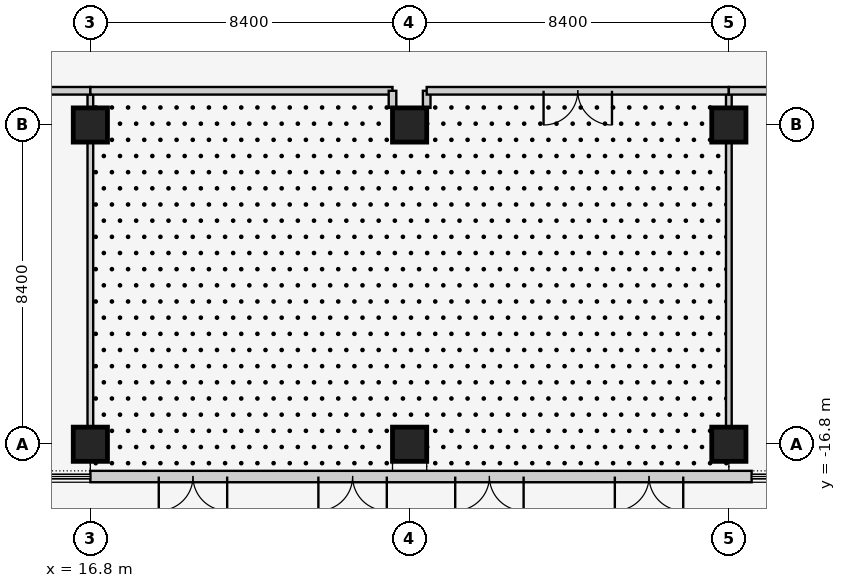
"""IFC4 building model, lengths in metres.
Left out: names, types, materials, properties, quantities, classifications, styles, units other than length and angle.
Written with IfcOpenShell. Run it as: python <this file> out.ifc"""

import sys

from ifc_helpers import new_model, si_unit, direction, frame, frame_2d, origin, origin_2d, place, context, subcontext, project, spatial, rectangle, extrude, element, fill, save


model = new_model("IFC4")
c1 = context("Model", 3, precision=1e-05, world=origin(), true_north=direction((0.0, 1.0)))
c2 = subcontext(c1, "Body", "Model", "MODEL_VIEW")
j1 = project(units=[si_unit("LENGTHUNIT", "METRE"), si_unit("PLANEANGLEUNIT", "RADIAN")], contexts=[c1])
p1 = place(None, origin())
s1 = spatial("IfcSite", under=j1, at=p1, CompositionType="ELEMENT")
p2 = place(p1, origin())
s2 = spatial("IfcBuilding", under=s1, at=p2, CompositionType="ELEMENT")
p3 = place(p2, origin())
s3 = spatial("IfcBuildingStorey", under=s2, at=p3, CompositionType="ELEMENT", Elevation=0.0)
for number, where, z_axis, x_axis in (
    (1, (16.8, -16.8, 0.0), (0.0, 0.0, 1.0), (1.0, 0.0, 0.0)),
    (2, (16.8, -8.4, 0.0), (0.0, 0.0, 1.0), (1.0, 0.0, 0.0)),
    (3, (25.2, -16.8, 0.0), (0.0, 0.0, 1.0), (1.0, 0.0, 0.0)),
    (4, (25.2, -8.4, 0.0), (0.0, 0.0, 1.0), (1.0, 0.0, 0.0)),
    (5, (33.6, -16.8, 0.0), (0.0, 0.0, 1.0), (1.0, 0.0, 0.0)),
    (6, (33.6, -8.4, 0.0), (0.0, 0.0, 1.0), (1.0, 0.0, 0.0)),
):
    element("IfcColumn", number, at=place(p3, frame(where, z_axis=z_axis, x_axis=x_axis)), inside=s3, PredefinedType="COLUMN", context=c2, shape_type="SweptSolid", body=[
        extrude(rectangle(XDim=0.9, YDim=0.9, at=origin_2d()), origin(), (0.0, 0.0, 1.0), 6.0),
    ])
p4 = place(p3, frame((16.8, -17.65, 0.0), z_axis=(0.0, 0.0, 1.0), x_axis=(1.0, 0.0, 0.0)))
e7 = element("IfcWall", 7, at=p4, inside=s3, PredefinedType="SOLIDWALL", context=c2, shape_type="SweptSolid", body=[
    extrude(rectangle(XDim=17.4, YDim=0.3, at=frame_2d((8.7, 0.0))), origin(), (0.0, 0.0, 1.0), 5.8),
])
p5 = place(p4, frame((1.8, 0.0, 0.0)))
e8 = element("IfcOpeningElement", 8, at=p5, cuts=e7, PredefinedType="OPENING", context=c2, shape_type="SweptSolid", body=[
    extrude(rectangle(XDim=1.8, YDim=2.4, at=frame_2d((0.9, 1.2))), frame((0.0, 0.16, 0.0), z_axis=(0.0, -1.0, 0.0), x_axis=(1.0, 0.0, 0.0)), (0.0, 0.0, 1.0), 0.32),
])
p6 = place(p4, frame((6.0, 0.0, 0.0)))
e9 = element("IfcOpeningElement", 9, at=p6, cuts=e7, PredefinedType="OPENING", context=c2, shape_type="SweptSolid", body=[
    extrude(rectangle(XDim=1.8, YDim=2.4, at=frame_2d((0.9, 1.2))), frame((0.0, 0.16, 0.0), z_axis=(0.0, -1.0, 0.0), x_axis=(1.0, 0.0, 0.0)), (0.0, 0.0, 1.0), 0.32),
])
p7 = place(p4, frame((9.6, 0.0, 0.0)))
e10 = element("IfcOpeningElement", 10, at=p7, cuts=e7, PredefinedType="OPENING", context=c2, shape_type="SweptSolid", body=[
    extrude(rectangle(XDim=1.8, YDim=2.4, at=frame_2d((0.9, 1.2))), frame((0.0, 0.16, 0.0), z_axis=(0.0, -1.0, 0.0), x_axis=(1.0, 0.0, 0.0)), (0.0, 0.0, 1.0), 0.32),
])
p8 = place(p4, frame((13.8, 0.0, 0.0)))
e11 = element("IfcOpeningElement", 11, at=p8, cuts=e7, PredefinedType="OPENING", context=c2, shape_type="SweptSolid", body=[
    extrude(rectangle(XDim=1.8, YDim=2.4, at=frame_2d((0.9, 1.2))), frame((0.0, 0.16, 0.0), z_axis=(0.0, -1.0, 0.0), x_axis=(1.0, 0.0, 0.0)), (0.0, 0.0, 1.0), 0.32),
])
p9 = place(p3, frame((16.8, -8.85, 0.0), z_axis=(0.0, 0.0, 1.0), x_axis=(0.0, -1.0, 0.0)))
e12 = element("IfcWall", 12, at=p9, inside=s3, PredefinedType="PARTITIONING", context=c2, shape_type="SweptSolid", body=[
    extrude(rectangle(XDim=7.5, YDim=0.15, at=frame_2d((3.75, 0.0))), origin(), (0.0, 0.0, 1.0), 5.043),
])
p10 = place(p3, frame((16.8, -7.5, 0.0), z_axis=(0.0, 0.0, 1.0), x_axis=(0.0, -1.0, 0.0)))
e13 = element("IfcWall", 13, at=p10, inside=s3, PredefinedType="PARTITIONING", context=c2, shape_type="SweptSolid", body=[
    extrude(rectangle(XDim=0.45, YDim=0.15, at=frame_2d((0.225, 0.0))), origin(), (0.0, 0.0, 1.0), 5.043),
])
p11 = place(p3, frame((11.7, -7.5, 0.0), z_axis=(0.0, 0.0, 1.0), x_axis=(1.0, 0.0, 0.0)))
e14 = element("IfcWall", 14, at=p11, inside=s3, PredefinedType="PARTITIONING", context=c2, shape_type="SweptSolid", body=[
    extrude(rectangle(XDim=5.1, YDim=0.2, at=frame_2d((2.55, 0.0))), origin(), (0.0, 0.0, 1.0), 5.8),
])
p12 = place(p11, frame((2.05, 0.0, 0.0)))
e15 = element("IfcOpeningElement", 15, at=p12, cuts=e14, PredefinedType="OPENING", context=c2, shape_type="SweptSolid", body=[
    extrude(rectangle(XDim=1.0, YDim=2.1, at=frame_2d((0.5, 1.05))), frame((0.0, 0.11, 0.0), z_axis=(0.0, -1.0, 0.0), x_axis=(1.0, 0.0, 0.0)), (0.0, 0.0, 1.0), 0.22),
])
p13 = place(p3, frame((33.6, -8.85, 0.0), z_axis=(0.0, 0.0, 1.0), x_axis=(0.0, -1.0, 0.0)))
e16 = element("IfcWall", 16, at=p13, inside=s3, PredefinedType="PARTITIONING", context=c2, shape_type="SweptSolid", body=[
    extrude(rectangle(XDim=7.5, YDim=0.15, at=frame_2d((3.75, 0.0))), origin(), (0.0, 0.0, 1.0), 5.043),
])
p14 = place(p3, frame((33.6, -7.5, 0.0), z_axis=(0.0, 0.0, 1.0), x_axis=(0.0, -1.0, 0.0)))
e17 = element("IfcWall", 17, at=p14, inside=s3, PredefinedType="PARTITIONING", context=c2, shape_type="SweptSolid", body=[
    extrude(rectangle(XDim=0.45, YDim=0.15, at=frame_2d((0.225, 0.0))), origin(), (0.0, 0.0, 1.0), 5.043),
])
p15 = place(p3, frame((16.8, -7.5, 0.0), z_axis=(0.0, 0.0, 1.0), x_axis=(1.0, 0.0, 0.0)))
e18 = element("IfcWall", 18, at=p15, inside=s3, PredefinedType="PARTITIONING", context=c2, shape_type="SweptSolid", body=[
    extrude(rectangle(XDim=7.95, YDim=0.2, at=frame_2d((3.975, 0.0))), origin(), (0.0, 0.0, 1.0), 5.8),
])
for number, where, z_axis, x_axis in (
    (19, (24.75, -7.5, 0.0), (0.0, 0.0, 1.0), (0.0, -1.0, 0.0)),
    (20, (25.65, -7.95, 0.0), (0.0, 0.0, 1.0), (0.0, 1.0, 0.0)),
):
    element("IfcWall", number, at=place(p3, frame(where, z_axis=z_axis, x_axis=x_axis)), inside=s3, PredefinedType="PARTITIONING", context=c2, shape_type="SweptSolid", body=[
        extrude(rectangle(XDim=0.45, YDim=0.2, at=frame_2d((0.225, 0.0))), origin(), (0.0, 0.0, 1.0), 5.8),
    ])
p16 = place(p3, frame((25.65, -7.5, 0.0), z_axis=(0.0, 0.0, 1.0), x_axis=(1.0, 0.0, 0.0)))
e21 = element("IfcWall", 21, at=p16, inside=s3, PredefinedType="PARTITIONING", context=c2, shape_type="SweptSolid", body=[
    extrude(rectangle(XDim=7.95, YDim=0.2, at=frame_2d((3.975, 0.0))), origin(), (0.0, 0.0, 1.0), 5.8),
])
p17 = place(p16, frame((3.075, 0.0, 0.0)))
e22 = element("IfcOpeningElement", 22, at=p17, cuts=e21, PredefinedType="OPENING", context=c2, shape_type="SweptSolid", body=[
    extrude(rectangle(XDim=1.8, YDim=2.4, at=frame_2d((0.9, 1.2))), frame((0.0, 0.11, 0.0), z_axis=(0.0, -1.0, 0.0), x_axis=(1.0, 0.0, 0.0)), (0.0, 0.0, 1.0), 0.22),
])
p18 = place(p3, frame((33.6, -7.5, 0.0), z_axis=(0.0, 0.0, 1.0), x_axis=(1.0, 0.0, 0.0)))
e23 = element("IfcWall", 23, at=p18, inside=s3, PredefinedType="PARTITIONING", context=c2, shape_type="SweptSolid", body=[
    extrude(rectangle(XDim=8.4, YDim=0.2, at=frame_2d((4.2, 0.0))), origin(), (0.0, 0.0, 1.0), 5.8),
])
p19 = place(p18, frame((3.7, 0.0, 0.0)))
e24 = element("IfcOpeningElement", 24, at=p19, cuts=e23, PredefinedType="OPENING", context=c2, shape_type="SweptSolid", body=[
    extrude(rectangle(XDim=1.0, YDim=2.1, at=frame_2d((0.5, 1.05))), frame((0.0, 0.11, 0.0), z_axis=(0.0, -1.0, 0.0), x_axis=(1.0, 0.0, 0.0)), (0.0, 0.0, 1.0), 0.22),
])
p20 = place(p5, frame((1.8, 0.0, 0.0), z_axis=(0.0, 0.0, 1.0), x_axis=(-1.0, 0.0, 0.0)))
e25 = element("IfcDoor", 25, at=p20, inside=s3, OperationType="DOUBLE_DOOR_SINGLE_SWING", PredefinedType="DOOR", context=c2, shape_type="SweptSolid", body=[
    extrude(rectangle(XDim=1.8, YDim=2.4, at=frame_2d((0.9, 1.2))), frame((0.0, 0.025, 0.0), z_axis=(0.0, -1.0, 0.0), x_axis=(1.0, 0.0, 0.0)), (0.0, 0.0, 1.0), 0.05),
])
fill(e8, e25)
p21 = place(p6, frame((1.8, 0.0, 0.0), z_axis=(0.0, 0.0, 1.0), x_axis=(-1.0, 0.0, 0.0)))
e26 = element("IfcDoor", 26, at=p21, inside=s3, OperationType="DOUBLE_DOOR_SINGLE_SWING", PredefinedType="DOOR", context=c2, shape_type="SweptSolid", body=[
    extrude(rectangle(XDim=1.8, YDim=2.4, at=frame_2d((0.9, 1.2))), frame((0.0, 0.025, 0.0), z_axis=(0.0, -1.0, 0.0), x_axis=(1.0, 0.0, 0.0)), (0.0, 0.0, 1.0), 0.05),
])
fill(e9, e26)
p22 = place(p7, frame((1.8, 0.0, 0.0), z_axis=(0.0, 0.0, 1.0), x_axis=(-1.0, 0.0, 0.0)))
e27 = element("IfcDoor", 27, at=p22, inside=s3, OperationType="DOUBLE_DOOR_SINGLE_SWING", PredefinedType="DOOR", context=c2, shape_type="SweptSolid", body=[
    extrude(rectangle(XDim=1.8, YDim=2.4, at=frame_2d((0.9, 1.2))), frame((0.0, 0.025, 0.0), z_axis=(0.0, -1.0, 0.0), x_axis=(1.0, 0.0, 0.0)), (0.0, 0.0, 1.0), 0.05),
])
fill(e10, e27)
p23 = place(p8, frame((1.8, 0.0, 0.0), z_axis=(0.0, 0.0, 1.0), x_axis=(-1.0, 0.0, 0.0)))
e28 = element("IfcDoor", 28, at=p23, inside=s3, OperationType="DOUBLE_DOOR_SINGLE_SWING", PredefinedType="DOOR", context=c2, shape_type="SweptSolid", body=[
    extrude(rectangle(XDim=1.8, YDim=2.4, at=frame_2d((0.9, 1.2))), frame((0.0, 0.025, 0.0), z_axis=(0.0, -1.0, 0.0), x_axis=(1.0, 0.0, 0.0)), (0.0, 0.0, 1.0), 0.05),
])
fill(e11, e28)
p24 = place(p17, frame((1.8, 0.0, 0.0), z_axis=(0.0, 0.0, 1.0), x_axis=(-1.0, 0.0, 0.0)))
e29 = element("IfcDoor", 29, at=p24, inside=s3, OperationType="DOUBLE_DOOR_SINGLE_SWING", PredefinedType="DOOR", context=c2, shape_type="SweptSolid", body=[
    extrude(rectangle(XDim=1.8, YDim=2.4, at=frame_2d((0.9, 1.2))), frame((0.0, 0.025, 0.0), z_axis=(0.0, -1.0, 0.0), x_axis=(1.0, 0.0, 0.0)), (0.0, 0.0, 1.0), 0.05),
])
fill(e22, e29)
save(model, sys.argv[1])
